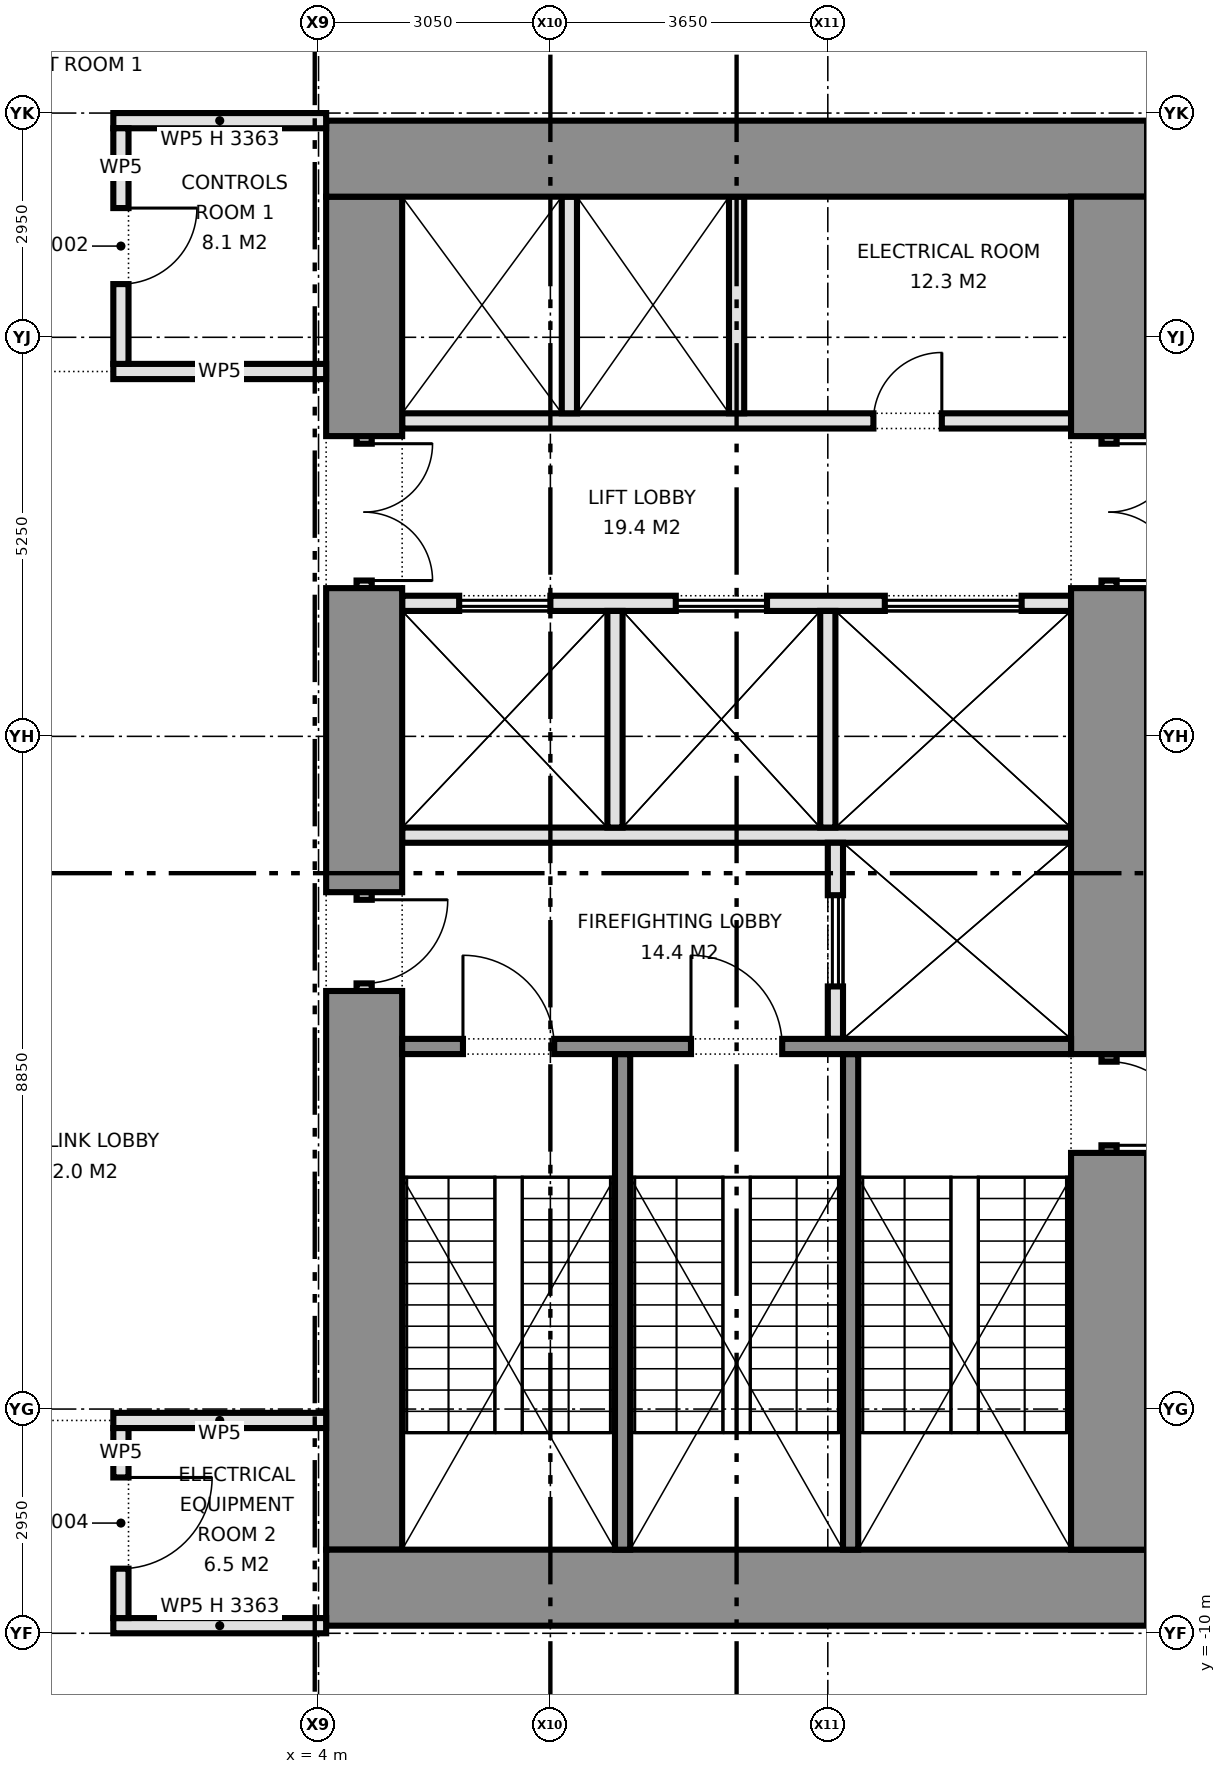
"""IFC4 building model, lengths in metres.
Left out: names, types, materials, properties, quantities, classifications, styles, units other than length and angle.
Written with IfcOpenShell. Run it as: python <this file> out.ifc"""

import sys

from ifc_helpers import new_model, si_unit, direction, frame, frame_2d, origin, place, context, subcontext, project, spatial, rectangle, extrude, element, fill, save


model = new_model("IFC4")
c1 = context("Model", 3, precision=1e-05, world=origin(), true_north=direction((0.0, 1.0)))
c2 = subcontext(c1, "Body", "Model", "MODEL_VIEW")
j1 = project(units=[si_unit("LENGTHUNIT", "METRE"), si_unit("PLANEANGLEUNIT", "RADIAN")], contexts=[c1])
p1 = place(None, origin())
s1 = spatial("IfcSite", under=j1, at=p1, CompositionType="ELEMENT")
p2 = place(p1, origin())
s2 = spatial("IfcBuilding", under=s1, at=p2, CompositionType="ELEMENT")
p3 = place(p2, frame((0.0, 0.0, 64.1)))
s3 = spatial("IfcBuildingStorey", under=s2, at=p3, CompositionType="ELEMENT", Elevation=64.1)
for number, where, z_axis, x_axis in (
    (1, (14.9, 9.4, 0.0), (0.0, 0.0, 1.0), (-1.0, 0.0, 0.0)),
    (2, (14.9, -9.4, 0.0), (0.0, 0.0, 1.0), (-1.0, 0.0, 0.0)),
):
    element("IfcWall", number, at=place(p3, frame(where, z_axis=z_axis, x_axis=x_axis)), inside=s3, PredefinedType="SHEAR", context=c2, shape_type="SweptSolid", body=[
        extrude(rectangle(XDim=10.8, YDim=1.0, at=frame_2d((5.4, 0.0))), origin(), (0.0, 0.0, 1.0), 4.3),
    ])
p4 = place(p3, frame((14.4, 8.9, 0.0), z_axis=(0.0, 0.0, 1.0), x_axis=(0.0, -1.0, 0.0)))
e3 = element("IfcWall", 3, at=p4, inside=s3, PredefinedType="SHEAR", context=c2, shape_type="SweptSolid", body=[
    extrude(rectangle(XDim=3.15, YDim=1.0, at=frame_2d((1.575, 0.0))), origin(), (0.0, 0.0, 1.0), 4.3),
])
p5 = place(p3, frame((14.4, 5.75, 0.0), z_axis=(0.0, 0.0, 1.0), x_axis=(0.0, -1.0, 0.0)))
e4 = element("IfcWall", 4, at=p5, inside=s3, PredefinedType="PARTITIONING", context=c2, shape_type="SweptSolid", body=[
    extrude(rectangle(XDim=2.0, YDim=0.2, at=frame_2d((1.0, 0.0))), origin(), (0.0, 0.0, 1.0), 2.4),
])
p6 = place(p5, frame((0.1, 0.0, 0.0)))
e5 = element("IfcOpeningElement", 5, at=p6, cuts=e4, PredefinedType="OPENING", context=c2, shape_type="SweptSolid", body=[
    extrude(rectangle(XDim=1.8, YDim=2.1, at=frame_2d((0.9, 1.05))), frame((0.0, 0.11, 0.0), z_axis=(0.0, -1.0, 0.0), x_axis=(1.0, 0.0, 0.0)), (0.0, 0.0, 1.0), 0.22),
])
p7 = place(p3, frame((14.4, 3.75, 0.0), z_axis=(0.0, 0.0, 1.0), x_axis=(0.0, -1.0, 0.0)))
e6 = element("IfcWall", 6, at=p7, inside=s3, PredefinedType="SHEAR", context=c2, shape_type="SweptSolid", body=[
    extrude(rectangle(XDim=6.13, YDim=1.0, at=frame_2d((3.065, 0.0))), origin(), (0.0, 0.0, 1.0), 4.3),
])
p8 = place(p3, frame((14.4, -2.38, 0.0), z_axis=(0.0, 0.0, 1.0), x_axis=(0.0, -1.0, 0.0)))
e7 = element("IfcWall", 7, at=p8, inside=s3, PredefinedType="SHEAR", context=c2, shape_type="SweptSolid", body=[
    extrude(rectangle(XDim=1.3, YDim=0.2, at=frame_2d((0.65, 0.0))), origin(), (0.0, 0.0, 1.0), 2.4),
])
p9 = place(p8, frame((0.1, 0.0, 0.0)))
e8 = element("IfcOpeningElement", 8, at=p9, cuts=e7, PredefinedType="OPENING", context=c2, shape_type="SweptSolid", body=[
    extrude(rectangle(XDim=1.1, YDim=2.1, at=frame_2d((0.55, 1.05))), frame((0.0, 0.11, 0.0), z_axis=(0.0, -1.0, 0.0), x_axis=(1.0, 0.0, 0.0)), (0.0, 0.0, 1.0), 0.22),
])
p10 = place(p3, frame((14.4, -3.68, 0.0), z_axis=(0.0, 0.0, 1.0), x_axis=(0.0, -1.0, 0.0)))
e9 = element("IfcWall", 9, at=p10, inside=s3, PredefinedType="SHEAR", context=c2, shape_type="SweptSolid", body=[
    extrude(rectangle(XDim=5.22, YDim=1.0, at=frame_2d((2.61, 0.0))), origin(), (0.0, 0.0, 1.0), 4.3),
])
p11 = place(p3, frame((4.6, 8.9, 0.0), z_axis=(0.0, 0.0, 1.0), x_axis=(0.0, -1.0, 0.0)))
e10 = element("IfcWall", 10, at=p11, inside=s3, PredefinedType="SHEAR", context=c2, shape_type="SweptSolid", body=[
    extrude(rectangle(XDim=3.15, YDim=1.0, at=frame_2d((1.575, 0.0))), origin(), (0.0, 0.0, 1.0), 4.3),
])
p12 = place(p3, frame((4.6, 5.75, 0.0), z_axis=(0.0, 0.0, 1.0), x_axis=(0.0, -1.0, 0.0)))
e11 = element("IfcWall", 11, at=p12, inside=s3, PredefinedType="PARTITIONING", context=c2, shape_type="SweptSolid", body=[
    extrude(rectangle(XDim=2.0, YDim=0.2, at=frame_2d((1.0, 0.0))), origin(), (0.0, 0.0, 1.0), 2.4),
])
p13 = place(p12, frame((0.1, 0.0, 0.0)))
e12 = element("IfcOpeningElement", 12, at=p13, cuts=e11, PredefinedType="OPENING", context=c2, shape_type="SweptSolid", body=[
    extrude(rectangle(XDim=1.8, YDim=2.1, at=frame_2d((0.9, 1.05))), frame((0.0, 0.11, 0.0), z_axis=(0.0, -1.0, 0.0), x_axis=(1.0, 0.0, 0.0)), (0.0, 0.0, 1.0), 0.22),
])
p14 = place(p3, frame((4.6, 3.75, 0.0), z_axis=(0.0, 0.0, 1.0), x_axis=(0.0, -1.0, 0.0)))
e13 = element("IfcWall", 13, at=p14, inside=s3, PredefinedType="SHEAR", context=c2, shape_type="SweptSolid", body=[
    extrude(rectangle(XDim=4.0, YDim=1.0, at=frame_2d((2.0, 0.0))), origin(), (0.0, 0.0, 1.0), 4.3),
])
p15 = place(p3, frame((4.6, -0.25, 0.0), z_axis=(0.0, 0.0, 1.0), x_axis=(0.0, -1.0, 0.0)))
e14 = element("IfcWall", 14, at=p15, inside=s3, PredefinedType="PARTITIONING", context=c2, shape_type="SweptSolid", body=[
    extrude(rectangle(XDim=1.3, YDim=0.2, at=frame_2d((0.65, 0.0))), origin(), (0.0, 0.0, 1.0), 2.4),
])
p16 = place(p15, frame((0.1, 0.0, 0.0)))
e15 = element("IfcOpeningElement", 15, at=p16, cuts=e14, PredefinedType="OPENING", context=c2, shape_type="SweptSolid", body=[
    extrude(rectangle(XDim=1.1, YDim=2.1, at=frame_2d((0.55, 1.05))), frame((0.0, 0.11, 0.0), z_axis=(0.0, -1.0, 0.0), x_axis=(1.0, 0.0, 0.0)), (0.0, 0.0, 1.0), 0.22),
])
p17 = place(p3, frame((4.6, -1.55, 0.0), z_axis=(0.0, 0.0, 1.0), x_axis=(0.0, -1.0, 0.0)))
e16 = element("IfcWall", 16, at=p17, inside=s3, PredefinedType="SHEAR", context=c2, shape_type="SweptSolid", body=[
    extrude(rectangle(XDim=7.35, YDim=1.0, at=frame_2d((3.675, 0.0))), origin(), (0.0, 0.0, 1.0), 4.3),
])
p18 = place(p3, frame((13.9, 5.95, 0.0), z_axis=(0.0, 0.0, 1.0), x_axis=(-1.0, 0.0, 0.0)))
e17 = element("IfcWall", 17, at=p18, inside=s3, PredefinedType="PARTITIONING", context=c2, shape_type="SweptSolid", body=[
    extrude(rectangle(XDim=8.8, YDim=0.2, at=frame_2d((4.4, 0.0))), origin(), (0.0, 0.0, 1.0), 4.3),
])
p19 = place(p18, frame((1.7, 0.0, 0.0)))
e18 = element("IfcOpeningElement", 18, at=p19, cuts=e17, PredefinedType="OPENING", context=c2, shape_type="SweptSolid", body=[
    extrude(rectangle(XDim=0.9, YDim=2.1, at=frame_2d((0.45, 1.05))), frame((0.0, 0.11, 0.0), z_axis=(0.0, -1.0, 0.0), x_axis=(1.0, 0.0, 0.0)), (0.0, 0.0, 1.0), 0.22),
])
p20 = place(p3, frame((13.9, 3.55, 0.0), z_axis=(0.0, 0.0, 1.0), x_axis=(-1.0, 0.0, 0.0)))
e19 = element("IfcWall", 19, at=p20, inside=s3, PredefinedType="PARTITIONING", context=c2, shape_type="SweptSolid", body=[
    extrude(rectangle(XDim=8.8, YDim=0.2, at=frame_2d((4.4, 0.0))), origin(), (0.0, 0.0, 1.0), 4.3),
])
p21 = place(p20, frame((0.65, 0.0, 0.0)))
e20 = element("IfcOpeningElement", 20, at=p21, cuts=e19, PredefinedType="OPENING", context=c2, shape_type="SweptSolid", body=[
    extrude(rectangle(XDim=1.8, YDim=2.1, at=frame_2d((0.9, 1.05))), frame((0.0, 0.11, 0.0), z_axis=(0.0, -1.0, 0.0), x_axis=(1.0, 0.0, 0.0)), (0.0, 0.0, 1.0), 0.22),
])
p22 = place(p20, frame((4.0, 0.0, 0.0)))
e21 = element("IfcOpeningElement", 21, at=p22, cuts=e19, PredefinedType="OPENING", context=c2, shape_type="SweptSolid", body=[
    extrude(rectangle(XDim=1.2, YDim=2.1, at=frame_2d((0.6, 1.05))), frame((0.0, 0.11, 0.0), z_axis=(0.0, -1.0, 0.0), x_axis=(1.0, 0.0, 0.0)), (0.0, 0.0, 1.0), 0.22),
])
p23 = place(p20, frame((6.85, 0.0, 0.0)))
e22 = element("IfcOpeningElement", 22, at=p23, cuts=e19, PredefinedType="OPENING", context=c2, shape_type="SweptSolid", body=[
    extrude(rectangle(XDim=1.2, YDim=2.1, at=frame_2d((0.6, 1.05))), frame((0.0, 0.11, 0.0), z_axis=(0.0, -1.0, 0.0), x_axis=(1.0, 0.0, 0.0)), (0.0, 0.0, 1.0), 0.22),
])
p24 = place(p3, frame((13.9, 0.5, 0.0), z_axis=(0.0, 0.0, 1.0), x_axis=(-1.0, 0.0, 0.0)))
e23 = element("IfcWall", 23, at=p24, inside=s3, PredefinedType="PARTITIONING", context=c2, shape_type="SweptSolid", body=[
    extrude(rectangle(XDim=8.8, YDim=0.2, at=frame_2d((4.4, 0.0))), origin(), (0.0, 0.0, 1.0), 4.3),
])
p25 = place(p3, frame((10.8, 0.4, 0.0), z_axis=(0.0, 0.0, 1.0), x_axis=(0.0, -1.0, 0.0)))
e24 = element("IfcWall", 24, at=p25, inside=s3, PredefinedType="PARTITIONING", context=c2, shape_type="SweptSolid", body=[
    extrude(rectangle(XDim=2.58, YDim=0.2, at=frame_2d((1.29, 0.0))), origin(), (0.0, 0.0, 1.0), 4.3),
])
p26 = place(p25, frame((0.69, 0.0, 0.0)))
e25 = element("IfcOpeningElement", 25, at=p26, cuts=e24, PredefinedType="OPENING", context=c2, shape_type="SweptSolid", body=[
    extrude(rectangle(XDim=1.2, YDim=2.1, at=frame_2d((0.6, 1.05))), frame((0.0, 0.11, 0.0), z_axis=(0.0, -1.0, 0.0), x_axis=(1.0, 0.0, 0.0)), (0.0, 0.0, 1.0), 0.22),
])
p27 = place(p3, frame((13.9, -2.28, 0.0), z_axis=(0.0, 0.0, 1.0), x_axis=(-1.0, 0.0, 0.0)))
e26 = element("IfcWall", 26, at=p27, inside=s3, PredefinedType="SHEAR", context=c2, shape_type="SweptSolid", body=[
    extrude(rectangle(XDim=8.8, YDim=0.2, at=frame_2d((4.4, 0.0))), origin(), (0.0, 0.0, 1.0), 4.3),
])
p28 = place(p27, frame((3.8, 0.0, 0.0)))
e27 = element("IfcOpeningElement", 27, at=p28, cuts=e26, PredefinedType="OPENING", context=c2, shape_type="SweptSolid", body=[
    extrude(rectangle(XDim=1.2, YDim=2.1, at=frame_2d((0.6, 1.05))), frame((0.0, 0.11, 0.0), z_axis=(0.0, -1.0, 0.0), x_axis=(1.0, 0.0, 0.0)), (0.0, 0.0, 1.0), 0.22),
])
p29 = place(p27, frame((6.8, 0.0, 0.0)))
e28 = element("IfcOpeningElement", 28, at=p29, cuts=e26, PredefinedType="OPENING", context=c2, shape_type="SweptSolid", body=[
    extrude(rectangle(XDim=1.2, YDim=2.1, at=frame_2d((0.6, 1.05))), frame((0.0, 0.11, 0.0), z_axis=(0.0, -1.0, 0.0), x_axis=(1.0, 0.0, 0.0)), (0.0, 0.0, 1.0), 0.22),
])
for number, where, z_axis, x_axis in (
    (29, (11.0, -2.38, 0.0), (0.0, 0.0, 1.0), (0.0, -1.0, 0.0)),
    (30, (8.0, -2.38, 0.0), (0.0, 0.0, 1.0), (0.0, -1.0, 0.0)),
):
    element("IfcWall", number, at=place(p3, frame(where, z_axis=z_axis, x_axis=x_axis)), inside=s3, PredefinedType="SHEAR", context=c2, shape_type="SweptSolid", body=[
        extrude(rectangle(XDim=6.52, YDim=0.2, at=frame_2d((3.26, 0.0))), origin(), (0.0, 0.0, 1.0), 4.3),
    ])
for number, where, z_axis, x_axis in (
    (31, (9.5, 8.9, 0.0), (0.0, 0.0, 1.0), (0.0, -1.0, 0.0)),
    (32, (7.3, 8.9, 0.0), (0.0, 0.0, 1.0), (0.0, -1.0, 0.0)),
    (33, (10.7, 3.45, 0.0), (0.0, 0.0, 1.0), (0.0, -1.0, 0.0)),
    (34, (7.9, 3.45, 0.0), (0.0, 0.0, 1.0), (0.0, -1.0, 0.0)),
):
    element("IfcWall", number, at=place(p3, frame(where, z_axis=z_axis, x_axis=x_axis)), inside=s3, PredefinedType="PARTITIONING", context=c2, shape_type="SweptSolid", body=[
        extrude(rectangle(XDim=2.85, YDim=0.2, at=frame_2d((1.425, 0.0))), origin(), (0.0, 0.0, 1.0), 4.3),
    ])
p30 = place(p3, frame((1.3, -9.9, 0.0), z_axis=(0.0, 0.0, 1.0), x_axis=(1.0, 0.0, 0.0)))
e35 = element("IfcWall", 35, at=p30, inside=s3, PredefinedType="PARTITIONING", context=c2, shape_type="SweptSolid", body=[
    extrude(rectangle(XDim=2.8, YDim=0.2, at=frame_2d((1.4, 0.0))), origin(), (0.0, 0.0, 1.0), 3.363),
])
for number, where, z_axis, x_axis in (
    (36, (1.3, -7.2, 0.0), (0.0, 0.0, 1.0), (1.0, 0.0, 0.0)),
    (37, (1.3, 6.6, 0.0), (0.0, 0.0, 1.0), (1.0, 0.0, 0.0)),
):
    element("IfcWall", number, at=place(p3, frame(where, z_axis=z_axis, x_axis=x_axis)), inside=s3, PredefinedType="PARTITIONING", context=c2, shape_type="SweptSolid", body=[
        extrude(rectangle(XDim=2.8, YDim=0.2, at=frame_2d((1.4, 0.0))), origin(), (0.0, 0.0, 1.0), 4.3),
    ])
p31 = place(p3, frame((1.3, 9.9, 0.0), z_axis=(0.0, 0.0, 1.0), x_axis=(1.0, 0.0, 0.0)))
e38 = element("IfcWall", 38, at=p31, inside=s3, PredefinedType="PARTITIONING", context=c2, shape_type="SweptSolid", body=[
    extrude(rectangle(XDim=2.8, YDim=0.2, at=frame_2d((1.4, 0.0))), origin(), (0.0, 0.0, 1.0), 3.363),
])
p32 = place(p3, frame((1.4, -9.8, 0.0), z_axis=(0.0, 0.0, 1.0), x_axis=(0.0, 1.0, 0.0)))
e39 = element("IfcWall", 39, at=p32, inside=s3, PredefinedType="PARTITIONING", context=c2, shape_type="SweptSolid", body=[
    extrude(rectangle(XDim=2.5, YDim=0.2, at=frame_2d((1.25, 0.0))), origin(), (0.0, 0.0, 1.0), 4.3),
])
p33 = place(p32, frame((0.65, 0.0, 0.0)))
e40 = element("IfcOpeningElement", 40, at=p33, cuts=e39, PredefinedType="OPENING", context=c2, shape_type="SweptSolid", body=[
    extrude(rectangle(XDim=1.2, YDim=2.1, at=frame_2d((0.6, 1.05))), frame((0.0, 0.11, 0.0), z_axis=(0.0, -1.0, 0.0), x_axis=(1.0, 0.0, 0.0)), (0.0, 0.0, 1.0), 0.22),
])
p34 = place(p3, frame((1.4, 6.7, 0.0), z_axis=(0.0, 0.0, 1.0), x_axis=(0.0, 1.0, 0.0)))
e41 = element("IfcWall", 41, at=p34, inside=s3, PredefinedType="PARTITIONING", context=c2, shape_type="SweptSolid", body=[
    extrude(rectangle(XDim=3.1, YDim=0.2, at=frame_2d((1.55, 0.0))), origin(), (0.0, 0.0, 1.0), 4.3),
])
p35 = place(p34, frame((1.05, 0.0, 0.0)))
e42 = element("IfcOpeningElement", 42, at=p35, cuts=e41, PredefinedType="OPENING", context=c2, shape_type="SweptSolid", body=[
    extrude(rectangle(XDim=1.0, YDim=2.1, at=frame_2d((0.5, 1.05))), frame((0.0, 0.11, 0.0), z_axis=(0.0, -1.0, 0.0), x_axis=(1.0, 0.0, 0.0)), (0.0, 0.0, 1.0), 0.22),
])
p36 = place(p6, origin())
e43 = element("IfcDoor", 43, at=p36, inside=s3, OperationType="DOUBLE_DOOR_SINGLE_SWING", PredefinedType="DOOR", context=c2, shape_type="SweptSolid", body=[
    extrude(rectangle(XDim=1.8, YDim=2.1, at=frame_2d((0.9, 1.05))), frame((0.0, 0.025, 0.0), z_axis=(0.0, -1.0, 0.0), x_axis=(1.0, 0.0, 0.0)), (0.0, 0.0, 1.0), 0.05),
])
fill(e5, e43)
p37 = place(p9, origin())
e44 = element("IfcDoor", 44, at=p37, inside=s3, OperationType="SINGLE_SWING_RIGHT", PredefinedType="DOOR", context=c2, shape_type="SweptSolid", body=[
    extrude(rectangle(XDim=1.1, YDim=2.1, at=frame_2d((0.55, 1.05))), frame((0.0, 0.025, 0.0), z_axis=(0.0, -1.0, 0.0), x_axis=(1.0, 0.0, 0.0)), (0.0, 0.0, 1.0), 0.05),
])
fill(e8, e44)
p38 = place(p13, origin())
e45 = element("IfcDoor", 45, at=p38, inside=s3, OperationType="DOUBLE_DOOR_SINGLE_SWING", PredefinedType="DOOR", context=c2, shape_type="SweptSolid", body=[
    extrude(rectangle(XDim=1.8, YDim=2.1, at=frame_2d((0.9, 1.05))), frame((0.0, 0.025, 0.0), z_axis=(0.0, -1.0, 0.0), x_axis=(1.0, 0.0, 0.0)), (0.0, 0.0, 1.0), 0.05),
])
fill(e12, e45)
p39 = place(p16, origin())
e46 = element("IfcDoor", 46, at=p39, inside=s3, OperationType="SINGLE_SWING_LEFT", PredefinedType="DOOR", context=c2, shape_type="SweptSolid", body=[
    extrude(rectangle(XDim=1.1, YDim=2.1, at=frame_2d((0.55, 1.05))), frame((0.0, 0.025, 0.0), z_axis=(0.0, -1.0, 0.0), x_axis=(1.0, 0.0, 0.0)), (0.0, 0.0, 1.0), 0.05),
])
fill(e15, e46)
p40 = place(p21, origin())
e47 = element("IfcDoor", 47, at=p40, inside=s3, OperationType="DOUBLE_DOOR_SLIDING", PredefinedType="DOOR", context=c2, shape_type="SweptSolid", body=[
    extrude(rectangle(XDim=1.8, YDim=2.1, at=frame_2d((0.9, 1.05))), frame((0.0, 0.025, 0.0), z_axis=(0.0, -1.0, 0.0), x_axis=(1.0, 0.0, 0.0)), (0.0, 0.0, 1.0), 0.05),
])
fill(e20, e47)
p41 = place(p22, origin())
e48 = element("IfcDoor", 48, at=p41, inside=s3, OperationType="DOUBLE_DOOR_SLIDING", PredefinedType="DOOR", context=c2, shape_type="SweptSolid", body=[
    extrude(rectangle(XDim=1.2, YDim=2.1, at=frame_2d((0.6, 1.05))), frame((0.0, 0.025, 0.0), z_axis=(0.0, -1.0, 0.0), x_axis=(1.0, 0.0, 0.0)), (0.0, 0.0, 1.0), 0.05),
])
fill(e21, e48)
p42 = place(p23, origin())
e49 = element("IfcDoor", 49, at=p42, inside=s3, OperationType="DOUBLE_DOOR_SLIDING", PredefinedType="DOOR", context=c2, shape_type="SweptSolid", body=[
    extrude(rectangle(XDim=1.2, YDim=2.1, at=frame_2d((0.6, 1.05))), frame((0.0, 0.025, 0.0), z_axis=(0.0, -1.0, 0.0), x_axis=(1.0, 0.0, 0.0)), (0.0, 0.0, 1.0), 0.05),
])
fill(e22, e49)
p43 = place(p26, origin())
e50 = element("IfcDoor", 50, at=p43, inside=s3, OperationType="DOUBLE_DOOR_SLIDING", PredefinedType="DOOR", context=c2, shape_type="SweptSolid", body=[
    extrude(rectangle(XDim=1.2, YDim=2.1, at=frame_2d((0.6, 1.05))), frame((0.0, 0.025, 0.0), z_axis=(0.0, -1.0, 0.0), x_axis=(1.0, 0.0, 0.0)), (0.0, 0.0, 1.0), 0.05),
])
fill(e25, e50)
p44 = place(p19, frame((0.9, 0.0, 0.0), z_axis=(0.0, 0.0, 1.0), x_axis=(-1.0, 0.0, 0.0)))
e51 = element("IfcDoor", 51, at=p44, inside=s3, OperationType="SINGLE_SWING_RIGHT", PredefinedType="DOOR", context=c2, shape_type="SweptSolid", body=[
    extrude(rectangle(XDim=0.9, YDim=2.1, at=frame_2d((0.45, 1.05))), frame((0.0, 0.025, 0.0), z_axis=(0.0, -1.0, 0.0), x_axis=(1.0, 0.0, 0.0)), (0.0, 0.0, 1.0), 0.05),
])
fill(e18, e51)
p45 = place(p28, frame((1.2, 0.0, 0.0), z_axis=(0.0, 0.0, 1.0), x_axis=(-1.0, 0.0, 0.0)))
e52 = element("IfcDoor", 52, at=p45, inside=s3, OperationType="SINGLE_SWING_LEFT", PredefinedType="DOOR", context=c2, shape_type="SweptSolid", body=[
    extrude(rectangle(XDim=1.2, YDim=2.1, at=frame_2d((0.6, 1.05))), frame((0.0, 0.025, 0.0), z_axis=(0.0, -1.0, 0.0), x_axis=(1.0, 0.0, 0.0)), (0.0, 0.0, 1.0), 0.05),
])
fill(e27, e52)
p46 = place(p29, frame((1.2, 0.0, 0.0), z_axis=(0.0, 0.0, 1.0), x_axis=(-1.0, 0.0, 0.0)))
e53 = element("IfcDoor", 53, at=p46, inside=s3, OperationType="SINGLE_SWING_LEFT", PredefinedType="DOOR", context=c2, shape_type="SweptSolid", body=[
    extrude(rectangle(XDim=1.2, YDim=2.1, at=frame_2d((0.6, 1.05))), frame((0.0, 0.025, 0.0), z_axis=(0.0, -1.0, 0.0), x_axis=(1.0, 0.0, 0.0)), (0.0, 0.0, 1.0), 0.05),
])
fill(e28, e53)
p47 = place(p35, frame((1.0, 0.0, 0.0), z_axis=(0.0, 0.0, 1.0), x_axis=(-1.0, 0.0, 0.0)))
e54 = element("IfcDoor", 54, at=p47, inside=s3, OperationType="SINGLE_SWING_LEFT", PredefinedType="DOOR", context=c2, shape_type="SweptSolid", body=[
    extrude(rectangle(XDim=1.0, YDim=2.1, at=frame_2d((0.5, 1.05))), frame((0.0, 0.025, 0.0), z_axis=(0.0, -1.0, 0.0), x_axis=(1.0, 0.0, 0.0)), (0.0, 0.0, 1.0), 0.05),
])
fill(e42, e54)
p48 = place(p33, frame((1.2, 0.0, 0.0), z_axis=(0.0, 0.0, 1.0), x_axis=(-1.0, 0.0, 0.0)))
e55 = element("IfcDoor", 55, at=p48, inside=s3, OperationType="SINGLE_SWING_LEFT", PredefinedType="DOOR", context=c2, shape_type="SweptSolid", body=[
    extrude(rectangle(XDim=1.2, YDim=2.1, at=frame_2d((0.6, 1.05))), frame((0.0, 0.025, 0.0), z_axis=(0.0, -1.0, 0.0), x_axis=(1.0, 0.0, 0.0)), (0.0, 0.0, 1.0), 0.05),
])
fill(e40, e55)
save(model, sys.argv[1])
